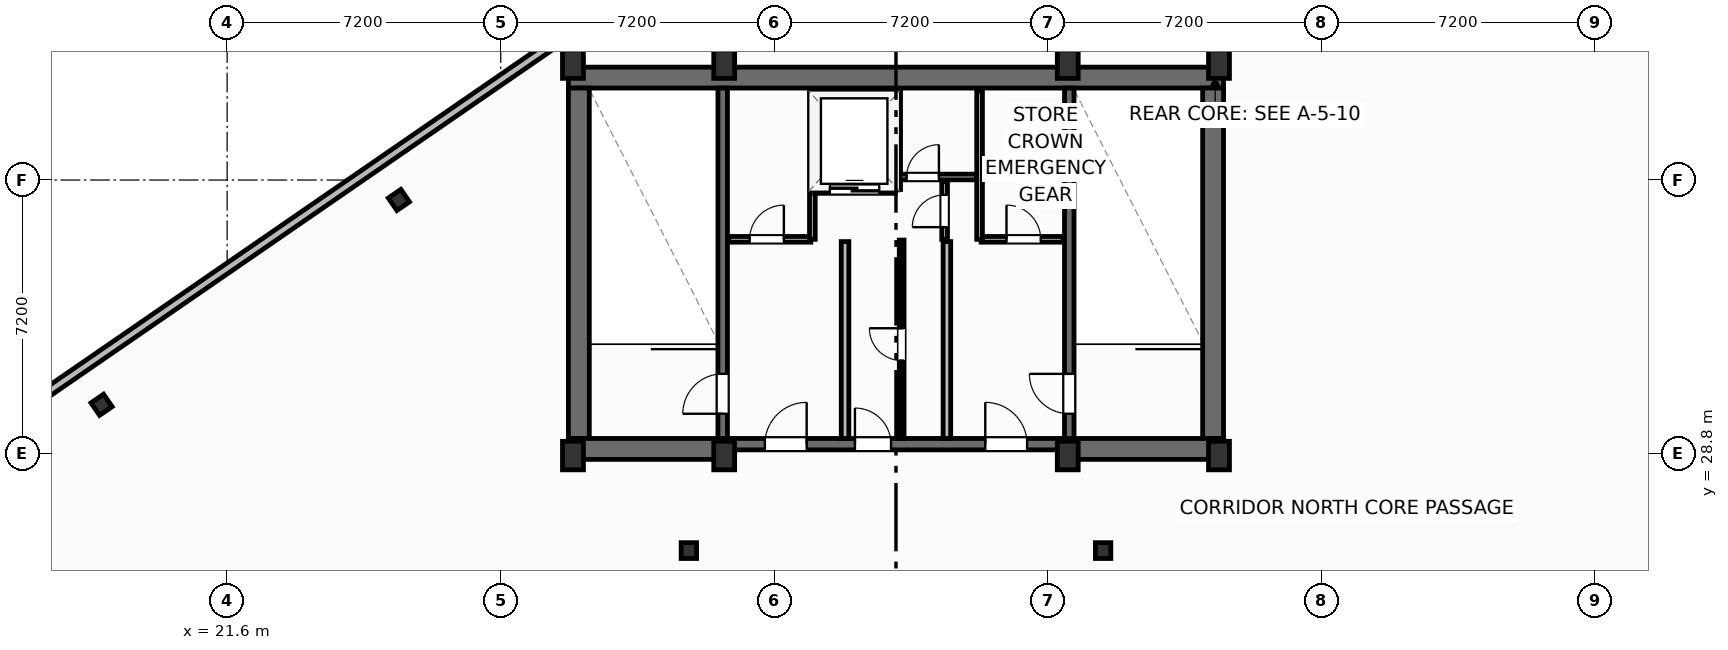
"""IFC4 building model, lengths in metres.
Left out: names, types, materials, properties, quantities, classifications, styles, units other than length and angle.
Written with IfcOpenShell. Run it as: python <this file> out.ifc"""

import sys

from ifc_helpers import new_model, si_unit, direction, frame, frame_2d, origin, origin_2d, place, context, subcontext, project, spatial, rectangle, i_section, extrude, element, fill, save


model = new_model("IFC4")
c1 = context("Model", 3, precision=1e-05, world=origin(), true_north=direction((0.0, 1.0)))
c2 = subcontext(c1, "Body", "Model", "MODEL_VIEW")
j1 = project(units=[si_unit("LENGTHUNIT", "METRE"), si_unit("PLANEANGLEUNIT", "RADIAN")], contexts=[c1])
p1 = place(None, origin())
s1 = spatial("IfcSite", under=j1, at=p1, CompositionType="ELEMENT")
p2 = place(p1, origin())
s2 = spatial("IfcBuilding", under=s1, at=p2, CompositionType="ELEMENT")
p3 = place(p2, frame((0.0, 0.0, 305.9)))
s3 = spatial("IfcBuildingStorey", under=s2, at=p3, CompositionType="ELEMENT", Elevation=305.9)
for number, where, z_axis, x_axis in (
    (1, (30.7, 28.75, 0.0), (0.0, 0.0, 1.0), (1.0, 0.0, 0.0)),
    (2, (34.68, 28.75, 0.0), (0.0, 0.0, 1.0), (1.0, 0.0, 0.0)),
    (3, (43.72, 28.75, 0.0), (0.0, 0.0, 1.0), (1.0, 0.0, 0.0)),
    (4, (47.7, 28.75, 0.0), (0.0, 0.0, 1.0), (1.0, 0.0, 0.0)),
    (5, (30.7, 39.05, 0.0), (0.0, 0.0, 1.0), (1.0, 0.0, 0.0)),
    (6, (34.68, 39.05, 0.0), (0.0, 0.0, 1.0), (1.0, 0.0, 0.0)),
    (7, (43.72, 39.05, 0.0), (0.0, 0.0, 1.0), (1.0, 0.0, 0.0)),
    (8, (47.7, 39.05, 0.0), (0.0, 0.0, 1.0), (1.0, 0.0, 0.0)),
):
    element("IfcColumn", number, at=place(p3, frame(where, z_axis=z_axis, x_axis=x_axis)), inside=s3, PredefinedType="COLUMN", context=c2, shape_type="SweptSolid", body=[
        extrude(rectangle(XDim=0.55, YDim=0.75, at=origin_2d()), origin(), (0.0, 0.0, 1.0), 4.8),
    ])
for number, where, z_axis, x_axis in (
    (9, (33.75, 26.25, 0.0), (0.0, 0.0, 1.0), (1.0, 0.0, 0.0)),
    (10, (44.65, 26.25, 0.0), (0.0, 0.0, 1.0), (1.0, 0.0, 0.0)),
):
    element("IfcColumn", number, at=place(p3, frame(where, z_axis=z_axis, x_axis=x_axis)), inside=s3, PredefinedType="COLUMN", context=c2, shape_type="SweptSolid", body=[
        extrude(i_section(OverallWidth=0.406, OverallDepth=0.416, WebThickness=0.03, FlangeThickness=0.048, FilletRadius=0.025, at=origin_2d()), origin(), (0.0, 0.0, 1.0), 4.8),
    ])
p4 = place(p3, frame((30.58, 38.695, 0.0), z_axis=(0.0, 0.0, 1.0), x_axis=(1.0, 0.0, 0.0)))
e11 = element("IfcWall", 11, at=p4, inside=s3, PredefinedType="SHEAR", context=c2, shape_type="SweptSolid", body=[
    extrude(rectangle(XDim=17.24, YDim=0.55, at=frame_2d((8.62, 0.0))), origin(), (0.0, 0.0, 1.0), 4.54),
])
for number, where, z_axis, x_axis in (
    (12, (30.855, 29.2, 0.0), (0.0, 0.0, 1.0), (0.0, 1.0, 0.0)),
    (13, (47.545, 29.2, 0.0), (0.0, 0.0, 1.0), (0.0, 1.0, 0.0)),
):
    element("IfcWall", number, at=place(p3, frame(where, z_axis=z_axis, x_axis=x_axis)), inside=s3, PredefinedType="SHEAR", context=c2, shape_type="SweptSolid", body=[
        extrude(rectangle(XDim=9.22, YDim=0.55, at=frame_2d((4.61, 0.0))), origin(), (0.0, 0.0, 1.0), 4.54),
    ])
for number, where, z_axis, x_axis in (
    (14, (30.58, 28.925, 0.0), (0.0, 0.0, 1.0), (1.0, 0.0, 0.0)),
    (15, (43.6, 28.925, 0.0), (0.0, 0.0, 1.0), (1.0, 0.0, 0.0)),
):
    element("IfcWall", number, at=place(p3, frame(where, z_axis=z_axis, x_axis=x_axis)), inside=s3, PredefinedType="SHEAR", context=c2, shape_type="SweptSolid", body=[
        extrude(rectangle(XDim=4.22, YDim=0.55, at=frame_2d((2.11, 0.0))), origin(), (0.0, 0.0, 1.0), 4.54),
    ])
p5 = place(p3, frame((34.8, 29.05, 0.0), z_axis=(0.0, 0.0, 1.0), x_axis=(1.0, 0.0, 0.0)))
e16 = element("IfcWall", 16, at=p5, inside=s3, PredefinedType="SHEAR", context=c2, shape_type="SweptSolid", body=[
    extrude(rectangle(XDim=8.8, YDim=0.3, at=frame_2d((4.4, 0.0))), origin(), (0.0, 0.0, 1.0), 4.54),
])
p6 = place(p5, frame((0.95, 0.0, 0.0)))
e17 = element("IfcOpeningElement", 17, at=p6, cuts=e16, PredefinedType="OPENING", context=c2, shape_type="SweptSolid", body=[
    extrude(rectangle(XDim=1.1, YDim=2.15, at=frame_2d((0.55, 1.075))), frame((0.0, 0.16, 0.0), z_axis=(0.0, -1.0, 0.0), x_axis=(1.0, 0.0, 0.0)), (0.0, 0.0, 1.0), 0.32),
])
p7 = place(p5, frame((6.75, 0.0, 0.0)))
e18 = element("IfcOpeningElement", 18, at=p7, cuts=e16, PredefinedType="OPENING", context=c2, shape_type="SweptSolid", body=[
    extrude(rectangle(XDim=1.1, YDim=2.15, at=frame_2d((0.55, 1.075))), frame((0.0, 0.16, 0.0), z_axis=(0.0, -1.0, 0.0), x_axis=(1.0, 0.0, 0.0)), (0.0, 0.0, 1.0), 0.32),
])
p8 = place(p5, frame((3.32, 0.0, 0.0)))
e19 = element("IfcOpeningElement", 19, at=p8, cuts=e16, PredefinedType="OPENING", context=c2, shape_type="SweptSolid", body=[
    extrude(rectangle(XDim=0.95, YDim=2.15, at=frame_2d((0.475, 1.075))), frame((0.0, 0.16, 0.0), z_axis=(0.0, -1.0, 0.0), x_axis=(1.0, 0.0, 0.0)), (0.0, 0.0, 1.0), 0.32),
])
p9 = place(p3, frame((34.64, 29.2, 0.0), z_axis=(0.0, 0.0, 1.0), x_axis=(0.0, 1.0, 0.0)))
e20 = element("IfcWall", 20, at=p9, inside=s3, PredefinedType="SHEAR", context=c2, shape_type="SweptSolid", body=[
    extrude(rectangle(XDim=9.22, YDim=0.25, at=frame_2d((4.61, 0.0))), origin(), (0.0, 0.0, 1.0), 4.54),
])
p10 = place(p9, frame((0.65, 0.0, 0.0)))
e21 = element("IfcOpeningElement", 21, at=p10, cuts=e20, PredefinedType="OPENING", context=c2, shape_type="SweptSolid", body=[
    extrude(rectangle(XDim=1.05, YDim=2.15, at=frame_2d((0.525, 1.075))), frame((0.0, 0.135, 0.0), z_axis=(0.0, -1.0, 0.0), x_axis=(1.0, 0.0, 0.0)), (0.0, 0.0, 1.0), 0.27),
])
p11 = place(p3, frame((43.76, 29.2, 0.0), z_axis=(0.0, 0.0, 1.0), x_axis=(0.0, 1.0, 0.0)))
e22 = element("IfcWall", 22, at=p11, inside=s3, PredefinedType="SHEAR", context=c2, shape_type="SweptSolid", body=[
    extrude(rectangle(XDim=9.22, YDim=0.25, at=frame_2d((4.61, 0.0))), origin(), (0.0, 0.0, 1.0), 4.54),
])
p12 = place(p11, frame((0.65, 0.0, 0.0)))
e23 = element("IfcOpeningElement", 23, at=p12, cuts=e22, PredefinedType="OPENING", context=c2, shape_type="SweptSolid", body=[
    extrude(rectangle(XDim=1.05, YDim=2.15, at=frame_2d((0.525, 1.075))), frame((0.0, 0.135, 0.0), z_axis=(0.0, -1.0, 0.0), x_axis=(1.0, 0.0, 0.0)), (0.0, 0.0, 1.0), 0.27),
])
for number, where, z_axis, x_axis in (
    (24, (26.119, 35.476, 0.0), (0.0, 0.0, 1.0), (0.824, 0.567, 0.0)),
    (25, (18.296, 30.086, 0.0), (0.0, 0.0, 1.0), (0.824, 0.567, 0.0)),
):
    element("IfcColumn", number, at=place(p3, frame(where, z_axis=z_axis, x_axis=x_axis)), inside=s3, PredefinedType="COLUMN", context=c2, shape_type="SweptSolid", body=[
        extrude(i_section(OverallWidth=0.401, OverallDepth=0.399, WebThickness=0.025, FlangeThickness=0.04, FilletRadius=0.022, at=origin_2d()), origin(), (0.0, 0.0, 1.0), 4.8),
    ])
p13 = place(p3, frame((68.409, 30.281, 0.0), z_axis=(0.0, 0.0, 1.0), x_axis=(-0.567267940859, 0.823533292146, 0.0)))
e26 = element("IfcWall", 26, at=p13, inside=s3, PredefinedType="SOLIDWALL", context=c2, shape_type="SweptSolid", body=[
    extrude(rectangle(XDim=24.959, YDim=0.24, at=frame_2d((12.48, 0.0))), origin(), (0.0, 0.0, 1.0), 3.82),
])
p14 = place(p3, frame((44.448, 49.412, 0.0), z_axis=(0.0, 0.0, 1.0), x_axis=(-0.823531813074, -0.567270088102, 0.0)))
e27 = element("IfcWall", 27, at=p14, inside=s3, PredefinedType="SOLIDWALL", context=c2, shape_type="SweptSolid", body=[
    extrude(rectangle(XDim=36.01, YDim=0.24, at=frame_2d((18.005, 0.0))), origin(), (0.0, 0.0, 1.0), 3.82),
])
for number, where, z_axis, x_axis in (
    (28, (37.86, 29.2, 0.0), (0.0, 0.0, 1.0), (0.0, 1.0, 0.0)),
    (29, (40.54, 29.2, 0.0), (0.0, 0.0, 1.0), (0.0, 1.0, 0.0)),
):
    element("IfcWall", number, at=place(p3, frame(where, z_axis=z_axis, x_axis=x_axis)), inside=s3, PredefinedType="PARTITIONING", context=c2, shape_type="SweptSolid", body=[
        extrude(rectangle(XDim=5.18, YDim=0.2, at=frame_2d((2.59, 0.0))), origin(), (0.0, 0.0, 1.0), 4.54),
    ])
p15 = place(p3, frame((34.8, 34.44, 0.0), z_axis=(0.0, 0.0, 1.0), x_axis=(1.0, 0.0, 0.0)))
e30 = element("IfcWall", 30, at=p15, inside=s3, PredefinedType="PARTITIONING", context=c2, shape_type="SweptSolid", body=[
    extrude(rectangle(XDim=2.16, YDim=0.15, at=frame_2d((1.08, 0.0))), origin(), (0.0, 0.0, 1.0), 4.54),
])
p16 = place(p15, frame((0.55, 0.0, 0.0)))
e31 = element("IfcOpeningElement", 31, at=p16, cuts=e30, PredefinedType="OPENING", context=c2, shape_type="SweptSolid", body=[
    extrude(rectangle(XDim=0.9, YDim=2.05, at=frame_2d((0.45, 1.025))), frame((0.0, 0.085, 0.0), z_axis=(0.0, -1.0, 0.0), x_axis=(1.0, 0.0, 0.0)), (0.0, 0.0, 1.0), 0.17),
])
p17 = place(p3, frame((37.0, 34.44, 0.0), z_axis=(0.0, 0.0, 1.0), x_axis=(0.0, 1.0, 0.0)))
e32 = element("IfcWall", 32, at=p17, inside=s3, PredefinedType="PARTITIONING", context=c2, shape_type="SweptSolid", body=[
    extrude(rectangle(XDim=3.9, YDim=0.15, at=frame_2d((1.95, 0.0))), origin(), (0.0, 0.0, 1.0), 4.54),
])
p18 = place(p3, frame((41.44, 34.44, 0.0), z_axis=(0.0, 0.0, 1.0), x_axis=(1.0, 0.0, 0.0)))
e33 = element("IfcWall", 33, at=p18, inside=s3, PredefinedType="PARTITIONING", context=c2, shape_type="SweptSolid", body=[
    extrude(rectangle(XDim=2.16, YDim=0.15, at=frame_2d((1.08, 0.0))), origin(), (0.0, 0.0, 1.0), 4.54),
])
p19 = place(p18, frame((0.668, 0.0, 0.0)))
e34 = element("IfcOpeningElement", 34, at=p19, cuts=e33, PredefinedType="OPENING", context=c2, shape_type="SweptSolid", body=[
    extrude(rectangle(XDim=0.9, YDim=2.05, at=frame_2d((0.45, 1.025))), frame((0.0, 0.085, 0.0), z_axis=(0.0, -1.0, 0.0), x_axis=(1.0, 0.0, 0.0)), (0.0, 0.0, 1.0), 0.17),
])
p20 = place(p3, frame((41.4, 34.44, 0.0), z_axis=(0.0, 0.0, 1.0), x_axis=(0.0, 1.0, 0.0)))
e35 = element("IfcWall", 35, at=p20, inside=s3, PredefinedType="PARTITIONING", context=c2, shape_type="SweptSolid", body=[
    extrude(rectangle(XDim=3.9, YDim=0.15, at=frame_2d((1.95, 0.0))), origin(), (0.0, 0.0, 1.0), 4.54),
])
p21 = place(p3, frame((37.06, 35.75, 0.0), z_axis=(0.0, 0.0, 1.0), x_axis=(1.0, 0.0, 0.0)))
e36 = element("IfcWall", 36, at=p21, inside=s3, PredefinedType="PARTITIONING", context=c2, shape_type="SweptSolid", body=[
    extrude(rectangle(XDim=2.12, YDim=0.2, at=frame_2d((1.06, 0.0))), origin(), (0.0, 0.0, 1.0), 4.54),
])
p22 = place(p21, frame((0.4, 0.0, 0.0)))
e37 = element("IfcOpeningElement", 37, at=p22, cuts=e36, PredefinedType="OPENING", context=c2, shape_type="SweptSolid", body=[
    extrude(rectangle(XDim=1.3, YDim=2.2, at=frame_2d((0.65, 1.1))), frame((0.0, 0.11, 0.0), z_axis=(0.0, -1.0, 0.0), x_axis=(1.0, 0.0, 0.0)), (0.0, 0.0, 1.0), 0.22),
])
p23 = place(p3, frame((39.22, 35.75, 0.0), z_axis=(0.0, 0.0, 1.0), x_axis=(0.0, 1.0, 0.0)))
e38 = element("IfcWall", 38, at=p23, inside=s3, PredefinedType="PARTITIONING", context=c2, shape_type="SweptSolid", body=[
    extrude(rectangle(XDim=2.59, YDim=0.2, at=frame_2d((1.295, 0.0))), origin(), (0.0, 0.0, 1.0), 4.54),
])
p24 = place(p3, frame((39.3, 36.08, 0.0), z_axis=(0.0, 0.0, 1.0), x_axis=(1.0, 0.0, 0.0)))
e39 = element("IfcWall", 39, at=p24, inside=s3, PredefinedType="PARTITIONING", context=c2, shape_type="SweptSolid", body=[
    extrude(rectangle(XDim=2.02, YDim=0.15, at=frame_2d((1.01, 0.0))), origin(), (0.0, 0.0, 1.0), 4.54),
])
p25 = place(p24, frame((0.18, 0.0, 0.0)))
e40 = element("IfcOpeningElement", 40, at=p25, cuts=e39, PredefinedType="OPENING", context=c2, shape_type="SweptSolid", body=[
    extrude(rectangle(XDim=0.85, YDim=2.05, at=frame_2d((0.425, 1.025))), frame((0.0, 0.085, 0.0), z_axis=(0.0, -1.0, 0.0), x_axis=(1.0, 0.0, 0.0)), (0.0, 0.0, 1.0), 0.17),
])
p26 = place(p3, frame((40.48, 34.44, 0.0), z_axis=(0.0, 0.0, 1.0), x_axis=(0.0, 1.0, 0.0)))
e41 = element("IfcWall", 41, at=p26, inside=s3, PredefinedType="PARTITIONING", context=c2, shape_type="SweptSolid", body=[
    extrude(rectangle(XDim=1.52, YDim=0.15, at=frame_2d((0.76, 0.0))), origin(), (0.0, 0.0, 1.0), 4.54),
])
p27 = place(p26, frame((0.32, 0.0, 0.0)))
e42 = element("IfcOpeningElement", 42, at=p27, cuts=e41, PredefinedType="OPENING", context=c2, shape_type="SweptSolid", body=[
    extrude(rectangle(XDim=0.85, YDim=2.05, at=frame_2d((0.425, 1.025))), frame((0.0, 0.085, 0.0), z_axis=(0.0, -1.0, 0.0), x_axis=(1.0, 0.0, 0.0)), (0.0, 0.0, 1.0), 0.17),
])
p28 = place(p3, frame((39.35, 29.2, 0.0), z_axis=(0.0, 0.0, 1.0), x_axis=(0.0, 1.0, 0.0)))
e43 = element("IfcWall", 43, at=p28, inside=s3, PredefinedType="PARTITIONING", context=c2, shape_type="SweptSolid", body=[
    extrude(rectangle(XDim=5.22, YDim=0.125, at=frame_2d((2.61, 0.0))), origin(), (0.0, 0.0, 1.0), 4.54),
])
p29 = place(p28, frame((2.05, 0.0, 0.0)))
e44 = element("IfcOpeningElement", 44, at=p29, cuts=e43, PredefinedType="OPENING", context=c2, shape_type="SweptSolid", body=[
    extrude(rectangle(XDim=0.85, YDim=2.05, at=frame_2d((0.425, 1.025))), frame((0.0, 0.073, 0.0), z_axis=(0.0, -1.0, 0.0), x_axis=(1.0, 0.0, 0.0)), (0.0, 0.0, 1.0), 0.145),
])
p30 = place(p10, origin())
e45 = element("IfcDoor", 45, at=p30, inside=s3, OperationType="SINGLE_SWING_LEFT", PredefinedType="DOOR", context=c2, shape_type="SweptSolid", body=[
    extrude(rectangle(XDim=1.05, YDim=2.15, at=frame_2d((0.525, 1.075))), frame((0.0, 0.025, 0.0), z_axis=(0.0, -1.0, 0.0), x_axis=(1.0, 0.0, 0.0)), (0.0, 0.0, 1.0), 0.05),
])
fill(e21, e45)
p31 = place(p12, origin())
e46 = element("IfcDoor", 46, at=p31, inside=s3, OperationType="SINGLE_SWING_RIGHT", PredefinedType="DOOR", context=c2, shape_type="SweptSolid", body=[
    extrude(rectangle(XDim=1.05, YDim=2.15, at=frame_2d((0.525, 1.075))), frame((0.0, 0.025, 0.0), z_axis=(0.0, -1.0, 0.0), x_axis=(1.0, 0.0, 0.0)), (0.0, 0.0, 1.0), 0.05),
])
fill(e23, e46)
p32 = place(p6, origin())
e47 = element("IfcDoor", 47, at=p32, inside=s3, OperationType="SINGLE_SWING_RIGHT", PredefinedType="DOOR", context=c2, shape_type="SweptSolid", body=[
    extrude(rectangle(XDim=1.1, YDim=2.15, at=frame_2d((0.55, 1.075))), frame((0.0, 0.025, 0.0), z_axis=(0.0, -1.0, 0.0), x_axis=(1.0, 0.0, 0.0)), (0.0, 0.0, 1.0), 0.05),
])
fill(e17, e47)
p33 = place(p7, origin())
e48 = element("IfcDoor", 48, at=p33, inside=s3, OperationType="SINGLE_SWING_LEFT", PredefinedType="DOOR", context=c2, shape_type="SweptSolid", body=[
    extrude(rectangle(XDim=1.1, YDim=2.15, at=frame_2d((0.55, 1.075))), frame((0.0, 0.025, 0.0), z_axis=(0.0, -1.0, 0.0), x_axis=(1.0, 0.0, 0.0)), (0.0, 0.0, 1.0), 0.05),
])
fill(e18, e48)
p34 = place(p16, origin())
e49 = element("IfcDoor", 49, at=p34, inside=s3, OperationType="SINGLE_SWING_RIGHT", PredefinedType="DOOR", context=c2, shape_type="SweptSolid", body=[
    extrude(rectangle(XDim=0.9, YDim=2.05, at=frame_2d((0.45, 1.025))), frame((0.0, 0.025, 0.0), z_axis=(0.0, -1.0, 0.0), x_axis=(1.0, 0.0, 0.0)), (0.0, 0.0, 1.0), 0.05),
])
fill(e31, e49)
p35 = place(p19, origin())
e50 = element("IfcDoor", 50, at=p35, inside=s3, OperationType="SINGLE_SWING_LEFT", PredefinedType="DOOR", context=c2, shape_type="SweptSolid", body=[
    extrude(rectangle(XDim=0.9, YDim=2.05, at=frame_2d((0.45, 1.025))), frame((0.0, 0.025, 0.0), z_axis=(0.0, -1.0, 0.0), x_axis=(1.0, 0.0, 0.0)), (0.0, 0.0, 1.0), 0.05),
])
fill(e34, e50)
p36 = place(p22, origin())
e51 = element("IfcDoor", 51, at=p36, inside=s3, OperationType="SLIDING_TO_LEFT", PredefinedType="DOOR", context=c2, shape_type="SweptSolid", body=[
    extrude(rectangle(XDim=1.3, YDim=2.2, at=frame_2d((0.65, 1.1))), frame((0.0, 0.025, 0.0), z_axis=(0.0, -1.0, 0.0), x_axis=(1.0, 0.0, 0.0)), (0.0, 0.0, 1.0), 0.05),
])
fill(e37, e51)
p37 = place(p25, origin())
e52 = element("IfcDoor", 52, at=p37, inside=s3, OperationType="SINGLE_SWING_RIGHT", PredefinedType="DOOR", context=c2, shape_type="SweptSolid", body=[
    extrude(rectangle(XDim=0.85, YDim=2.05, at=frame_2d((0.425, 1.025))), frame((0.0, 0.025, 0.0), z_axis=(0.0, -1.0, 0.0), x_axis=(1.0, 0.0, 0.0)), (0.0, 0.0, 1.0), 0.05),
])
fill(e40, e52)
p38 = place(p27, origin())
e53 = element("IfcDoor", 53, at=p38, inside=s3, OperationType="SINGLE_SWING_LEFT", PredefinedType="DOOR", context=c2, shape_type="SweptSolid", body=[
    extrude(rectangle(XDim=0.85, YDim=2.05, at=frame_2d((0.425, 1.025))), frame((0.0, 0.025, 0.0), z_axis=(0.0, -1.0, 0.0), x_axis=(1.0, 0.0, 0.0)), (0.0, 0.0, 1.0), 0.05),
])
fill(e42, e53)
p39 = place(p29, origin())
e54 = element("IfcDoor", 54, at=p39, inside=s3, OperationType="SINGLE_SWING_RIGHT", PredefinedType="DOOR", context=c2, shape_type="SweptSolid", body=[
    extrude(rectangle(XDim=0.85, YDim=2.05, at=frame_2d((0.425, 1.025))), frame((0.0, 0.025, 0.0), z_axis=(0.0, -1.0, 0.0), x_axis=(1.0, 0.0, 0.0)), (0.0, 0.0, 1.0), 0.05),
])
fill(e44, e54)
p40 = place(p8, origin())
e55 = element("IfcDoor", 55, at=p40, inside=s3, OperationType="SINGLE_SWING_LEFT", PredefinedType="DOOR", context=c2, shape_type="SweptSolid", body=[
    extrude(rectangle(XDim=0.95, YDim=2.15, at=frame_2d((0.475, 1.075))), frame((0.0, 0.025, 0.0), z_axis=(0.0, -1.0, 0.0), x_axis=(1.0, 0.0, 0.0)), (0.0, 0.0, 1.0), 0.05),
])
fill(e19, e55)
save(model, sys.argv[1])
